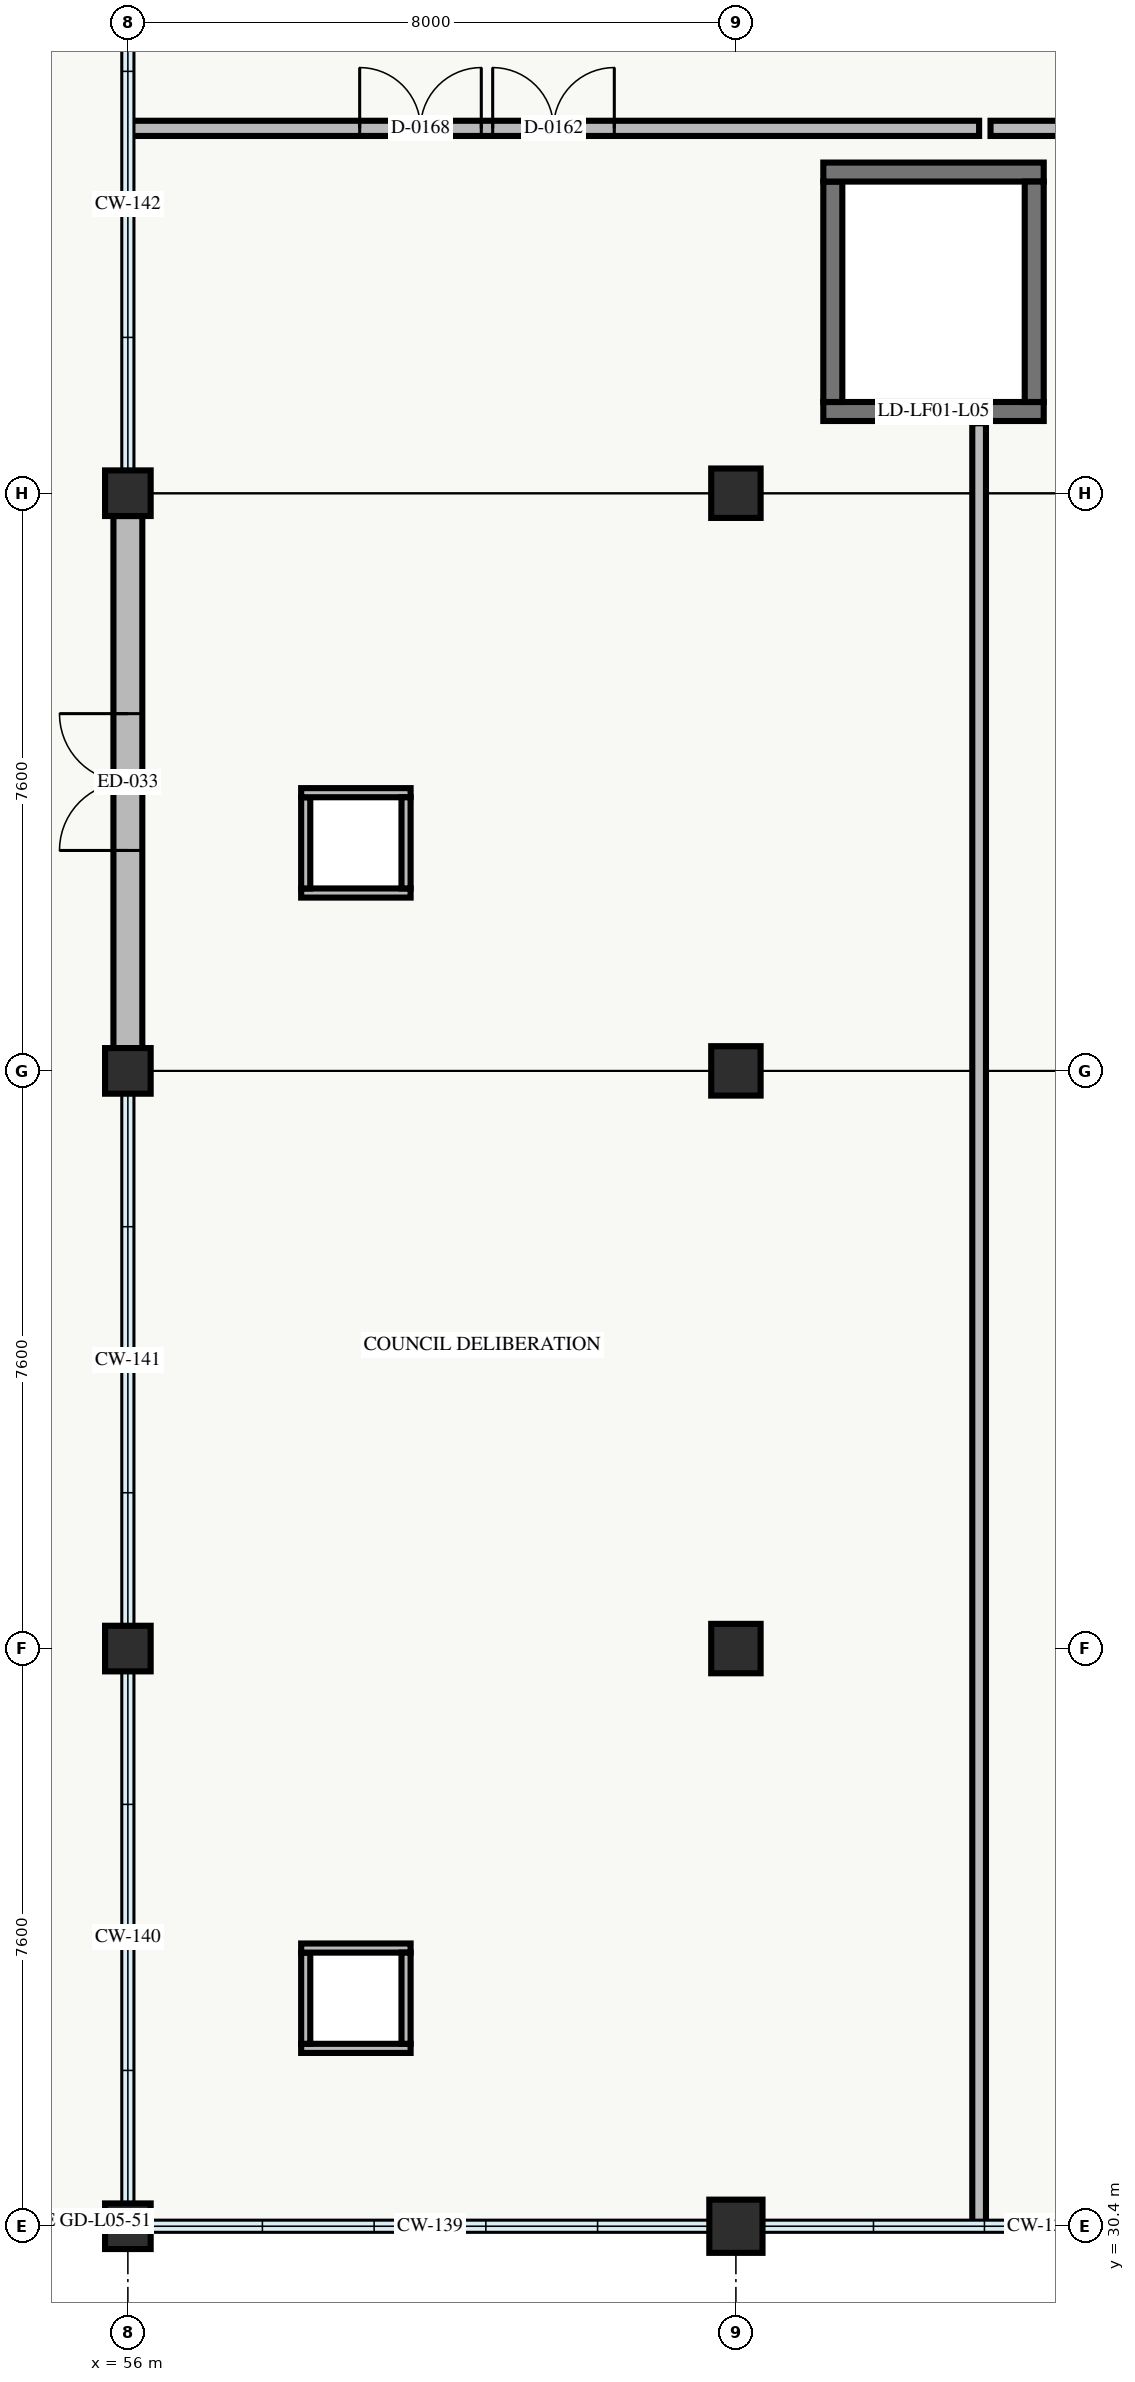
"""IFC4 building model, lengths in metres.
Left out: names, types, materials, properties, quantities, classifications, styles, units other than length and angle.
Written with IfcOpenShell. Run it as: python <this file> out.ifc"""

import sys

from ifc_helpers import new_model, si_unit, direction, frame, frame_2d, origin, origin_2d, place, context, subcontext, project, spatial, rectangle, extrude, element, fill, save


model = new_model("IFC4")
c1 = context("Model", 3, precision=1e-05, world=origin(), true_north=direction((0.0, 1.0)))
c2 = subcontext(c1, "Body", "Model", "MODEL_VIEW")
j1 = project(units=[si_unit("LENGTHUNIT", "METRE"), si_unit("PLANEANGLEUNIT", "RADIAN")], contexts=[c1])
p1 = place(None, origin())
s1 = spatial("IfcSite", under=j1, at=p1, CompositionType="ELEMENT")
p2 = place(p1, origin())
s2 = spatial("IfcBuilding", under=s1, at=p2, CompositionType="ELEMENT")
p3 = place(p2, frame((0.0, 0.0, 18.9)))
s3 = spatial("IfcBuildingStorey", under=s2, at=p3, CompositionType="ELEMENT", Elevation=18.9)
for number, where, z_axis, x_axis in (
    (1, (56.0, 30.4, 0.0), (0.0, 0.0, 1.0), (1.0, 0.0, 0.0)),
    (2, (56.0, 38.0, 0.0), (0.0, 0.0, 1.0), (1.0, 0.0, 0.0)),
    (3, (56.0, 45.6, 0.0), (0.0, 0.0, 1.0), (1.0, 0.0, 0.0)),
    (4, (56.0, 53.2, 0.0), (0.0, 0.0, 1.0), (1.0, 0.0, 0.0)),
):
    element("IfcColumn", number, at=place(p3, frame(where, z_axis=z_axis, x_axis=x_axis)), inside=s3, PredefinedType="COLUMN", context=c2, shape_type="SweptSolid", body=[
        extrude(rectangle(XDim=0.6, YDim=0.6, at=origin_2d()), origin(), (0.0, 0.0, 1.0), 4.8),
    ])
p4 = place(p3, frame((64.0, 30.4, 0.0), z_axis=(0.0, 0.0, 1.0), x_axis=(1.0, 0.0, 0.0)))
e5 = element("IfcColumn", 5, at=p4, inside=s3, PredefinedType="COLUMN", context=c2, shape_type="SweptSolid", body=[
    extrude(rectangle(XDim=0.7, YDim=0.7, at=origin_2d()), origin(), (0.0, 0.0, 1.0), 4.8),
])
for number, where, z_axis, x_axis in (
    (6, (64.0, 38.0, 0.0), (0.0, 0.0, 1.0), (1.0, 0.0, 0.0)),
    (7, (64.0, 45.6, 0.0), (0.0, 0.0, 1.0), (1.0, 0.0, 0.0)),
    (8, (64.0, 53.2, 0.0), (0.0, 0.0, 1.0), (1.0, 0.0, 0.0)),
):
    element("IfcColumn", number, at=place(p3, frame(where, z_axis=z_axis, x_axis=x_axis)), inside=s3, PredefinedType="COLUMN", context=c2, shape_type="SweptSolid", body=[
        extrude(rectangle(XDim=0.65, YDim=0.65, at=origin_2d()), origin(), (0.0, 0.0, 1.0), 4.8),
    ])
p5 = place(p3, frame((56.0, 45.9, 0.0), z_axis=(0.0, 0.0, 1.0), x_axis=(0.0, 1.0, 0.0)))
e9 = element("IfcWall", 9, at=p5, inside=s3, PredefinedType="STANDARD", context=c2, shape_type="SweptSolid", body=[
    extrude(rectangle(XDim=7.0, YDim=0.38, at=frame_2d((3.5, 0.0))), origin(), (0.0, 0.0, 1.0), 3.97),
])
p6 = place(p5, frame((2.6, 0.0, 0.0)))
e10 = element("IfcOpeningElement", 10, at=p6, cuts=e9, PredefinedType="OPENING", context=c2, shape_type="SweptSolid", body=[
    extrude(rectangle(XDim=1.8, YDim=2.4, at=frame_2d((0.9, 1.2))), frame((0.0, 0.2, 0.0), z_axis=(0.0, -1.0, 0.0), x_axis=(1.0, 0.0, 0.0)), (0.0, 0.0, 1.0), 0.4),
])
p7 = place(p3, frame((68.05, 54.275, 0.0), z_axis=(0.0, 0.0, 1.0), x_axis=(-1.0, 0.0, 0.0)))
e11 = element("IfcWall", 11, at=p7, inside=s3, PredefinedType="SHEAR", context=c2, shape_type="SweptSolid", body=[
    extrude(rectangle(XDim=2.9, YDim=0.25, at=frame_2d((1.45, 0.0))), origin(), (0.0, 0.0, 1.0), 4.57),
])
p8 = place(p7, frame((0.9, 0.0, 0.0)))
e12 = element("IfcOpeningElement", 12, at=p8, cuts=e11, PredefinedType="OPENING", context=c2, shape_type="SweptSolid", body=[
    extrude(rectangle(XDim=1.1, YDim=2.15, at=frame_2d((0.55, 1.075))), frame((0.0, 0.135, 0.0), z_axis=(0.0, -1.0, 0.0), x_axis=(1.0, 0.0, 0.0)), (0.0, 0.0, 1.0), 0.27),
])
for number, where, z_axis, x_axis in (
    (13, (65.275, 54.4, 0.0), (0.0, 0.0, 1.0), (0.0, 1.0, 0.0)),
    (14, (65.15, 57.425, 0.0), (0.0, 0.0, 1.0), (1.0, 0.0, 0.0)),
    (15, (67.925, 57.3, 0.0), (0.0, 0.0, 1.0), (0.0, -1.0, 0.0)),
):
    element("IfcWall", number, at=place(p3, frame(where, z_axis=z_axis, x_axis=x_axis)), inside=s3, PredefinedType="SHEAR", context=c2, shape_type="SweptSolid", body=[
        extrude(rectangle(XDim=2.9, YDim=0.25, at=frame_2d((1.45, 0.0))), origin(), (0.0, 0.0, 1.0), 4.57),
    ])
p9 = place(p3, frame((59.72, 32.74, 0.0), z_axis=(0.0, 0.0, 1.0), x_axis=(-1.0, 0.0, 0.0)))
e16 = element("IfcWall", 16, at=p9, inside=s3, PredefinedType="PARTITIONING", context=c2, shape_type="SweptSolid", body=[
    extrude(rectangle(XDim=1.44, YDim=0.12, at=frame_2d((0.72, 0.0))), origin(), (0.0, 0.0, 1.0), 4.52),
])
p10 = place(p3, frame((58.34, 32.8, 0.0), z_axis=(0.0, 0.0, 1.0), x_axis=(0.0, 1.0, 0.0)))
e17 = element("IfcWall", 17, at=p10, inside=s3, PredefinedType="PARTITIONING", context=c2, shape_type="SweptSolid", body=[
    extrude(rectangle(XDim=1.2, YDim=0.12, at=frame_2d((0.6, 0.0))), origin(), (0.0, 0.0, 1.0), 4.52),
])
p11 = place(p3, frame((58.28, 34.06, 0.0), z_axis=(0.0, 0.0, 1.0), x_axis=(1.0, 0.0, 0.0)))
e18 = element("IfcWall", 18, at=p11, inside=s3, PredefinedType="PARTITIONING", context=c2, shape_type="SweptSolid", body=[
    extrude(rectangle(XDim=1.44, YDim=0.12, at=frame_2d((0.72, 0.0))), origin(), (0.0, 0.0, 1.0), 4.52),
])
p12 = place(p3, frame((59.66, 34.0, 0.0), z_axis=(0.0, 0.0, 1.0), x_axis=(0.0, -1.0, 0.0)))
e19 = element("IfcWall", 19, at=p12, inside=s3, PredefinedType="PARTITIONING", context=c2, shape_type="SweptSolid", body=[
    extrude(rectangle(XDim=1.2, YDim=0.12, at=frame_2d((0.6, 0.0))), origin(), (0.0, 0.0, 1.0), 4.52),
])
p13 = place(p3, frame((59.72, 47.94, 0.0), z_axis=(0.0, 0.0, 1.0), x_axis=(-1.0, 0.0, 0.0)))
e20 = element("IfcWall", 20, at=p13, inside=s3, PredefinedType="PARTITIONING", context=c2, shape_type="SweptSolid", body=[
    extrude(rectangle(XDim=1.44, YDim=0.12, at=frame_2d((0.72, 0.0))), origin(), (0.0, 0.0, 1.0), 4.52),
])
p14 = place(p3, frame((58.34, 48.0, 0.0), z_axis=(0.0, 0.0, 1.0), x_axis=(0.0, 1.0, 0.0)))
e21 = element("IfcWall", 21, at=p14, inside=s3, PredefinedType="PARTITIONING", context=c2, shape_type="SweptSolid", body=[
    extrude(rectangle(XDim=1.2, YDim=0.12, at=frame_2d((0.6, 0.0))), origin(), (0.0, 0.0, 1.0), 4.52),
])
p15 = place(p3, frame((58.28, 49.26, 0.0), z_axis=(0.0, 0.0, 1.0), x_axis=(1.0, 0.0, 0.0)))
e22 = element("IfcWall", 22, at=p15, inside=s3, PredefinedType="PARTITIONING", context=c2, shape_type="SweptSolid", body=[
    extrude(rectangle(XDim=1.44, YDim=0.12, at=frame_2d((0.72, 0.0))), origin(), (0.0, 0.0, 1.0), 4.52),
])
p16 = place(p3, frame((59.66, 49.2, 0.0), z_axis=(0.0, 0.0, 1.0), x_axis=(0.0, -1.0, 0.0)))
e23 = element("IfcWall", 23, at=p16, inside=s3, PredefinedType="PARTITIONING", context=c2, shape_type="SweptSolid", body=[
    extrude(rectangle(XDim=1.2, YDim=0.12, at=frame_2d((0.6, 0.0))), origin(), (0.0, 0.0, 1.0), 4.52),
])
p17 = place(p3, frame((67.2, 54.12, 0.0), z_axis=(0.0, 0.0, 1.0), x_axis=(0.0, -1.0, 0.0)))
e24 = element("IfcWall", 24, at=p17, inside=s3, PredefinedType="PARTITIONING", context=c2, shape_type="SweptSolid", body=[
    extrude(rectangle(XDim=23.72, YDim=0.18, at=frame_2d((11.86, 0.0))), origin(), (0.0, 0.0, 1.0), 2.77),
])
p18 = place(p3, frame((56.0, 58.0, 0.0), z_axis=(0.0, 0.0, 1.0), x_axis=(1.0, 0.0, 0.0)))
e25 = element("IfcWall", 25, at=p18, inside=s3, PredefinedType="STANDARD", context=c2, shape_type="SweptSolid", body=[
    extrude(rectangle(XDim=11.2, YDim=0.2, at=frame_2d((5.6, 0.0))), origin(), (0.0, 0.0, 1.0), 4.52),
])
p19 = place(p18, frame((4.8, 0.0, 0.0)))
e26 = element("IfcOpeningElement", 26, at=p19, cuts=e25, PredefinedType="OPENING", context=c2, shape_type="SweptSolid", body=[
    extrude(rectangle(XDim=1.6, YDim=2.3, at=frame_2d((0.8, 1.15))), frame((0.0, 0.11, 0.0), z_axis=(0.0, -1.0, 0.0), x_axis=(1.0, 0.0, 0.0)), (0.0, 0.0, 1.0), 0.22),
])
p20 = place(p18, frame((3.05, 0.0, 0.0)))
e27 = element("IfcOpeningElement", 27, at=p20, cuts=e25, PredefinedType="OPENING", context=c2, shape_type="SweptSolid", body=[
    extrude(rectangle(XDim=1.6, YDim=2.3, at=frame_2d((0.8, 1.15))), frame((0.0, 0.11, 0.0), z_axis=(0.0, -1.0, 0.0), x_axis=(1.0, 0.0, 0.0)), (0.0, 0.0, 1.0), 0.22),
])
p21 = place(p3, frame((67.35, 58.0, 0.0), z_axis=(0.0, 0.0, 1.0), x_axis=(1.0, 0.0, 0.0)))
e28 = element("IfcWall", 28, at=p21, inside=s3, PredefinedType="STANDARD", context=c2, shape_type="SweptSolid", body=[
    extrude(rectangle(XDim=33.3, YDim=0.2, at=frame_2d((16.65, 0.0))), origin(), (0.0, 0.0, 1.0), 2.77),
])
p22 = place(p21, frame((16.125, 0.0, 0.0)))
e29 = element("IfcOpeningElement", 29, at=p22, cuts=e28, PredefinedType="OPENING", context=c2, shape_type="SweptSolid", body=[
    extrude(rectangle(XDim=1.05, YDim=2.15, at=frame_2d((0.525, 1.075))), frame((0.0, 0.11, 0.0), z_axis=(0.0, -1.0, 0.0), x_axis=(1.0, 0.0, 0.0)), (0.0, 0.0, 1.0), 0.22),
])
p23 = place(p6, origin())
e30 = element("IfcDoor", 30, at=p23, inside=s3, OperationType="DOUBLE_DOOR_SINGLE_SWING", PredefinedType="DOOR", context=c2, shape_type="SweptSolid", body=[
    extrude(rectangle(XDim=1.8, YDim=2.4, at=frame_2d((0.9, 1.2))), frame((0.0, 0.025, 0.0), z_axis=(0.0, -1.0, 0.0), x_axis=(1.0, 0.0, 0.0)), (0.0, 0.0, 1.0), 0.05),
])
fill(e10, e30)
p24 = place(p8, origin())
e31 = element("IfcDoor", 31, at=p24, inside=s3, OperationType="DOUBLE_DOOR_SLIDING", PredefinedType="DOOR", context=c2, shape_type="SweptSolid", body=[
    extrude(rectangle(XDim=1.1, YDim=2.15, at=frame_2d((0.55, 1.075))), frame((0.0, 0.025, 0.0), z_axis=(0.0, -1.0, 0.0), x_axis=(1.0, 0.0, 0.0)), (0.0, 0.0, 1.0), 0.05),
])
fill(e12, e31)
p25 = place(p19, origin())
e32 = element("IfcDoor", 32, at=p25, inside=s3, OperationType="DOUBLE_DOOR_SINGLE_SWING", PredefinedType="DOOR", context=c2, shape_type="SweptSolid", body=[
    extrude(rectangle(XDim=1.6, YDim=2.3, at=frame_2d((0.8, 1.15))), frame((0.0, 0.025, 0.0), z_axis=(0.0, -1.0, 0.0), x_axis=(1.0, 0.0, 0.0)), (0.0, 0.0, 1.0), 0.05),
])
fill(e26, e32)
p26 = place(p20, origin())
e33 = element("IfcDoor", 33, at=p26, inside=s3, OperationType="DOUBLE_DOOR_SINGLE_SWING", PredefinedType="DOOR", context=c2, shape_type="SweptSolid", body=[
    extrude(rectangle(XDim=1.6, YDim=2.3, at=frame_2d((0.8, 1.15))), frame((0.0, 0.025, 0.0), z_axis=(0.0, -1.0, 0.0), x_axis=(1.0, 0.0, 0.0)), (0.0, 0.0, 1.0), 0.05),
])
fill(e27, e33)
save(model, sys.argv[1])
